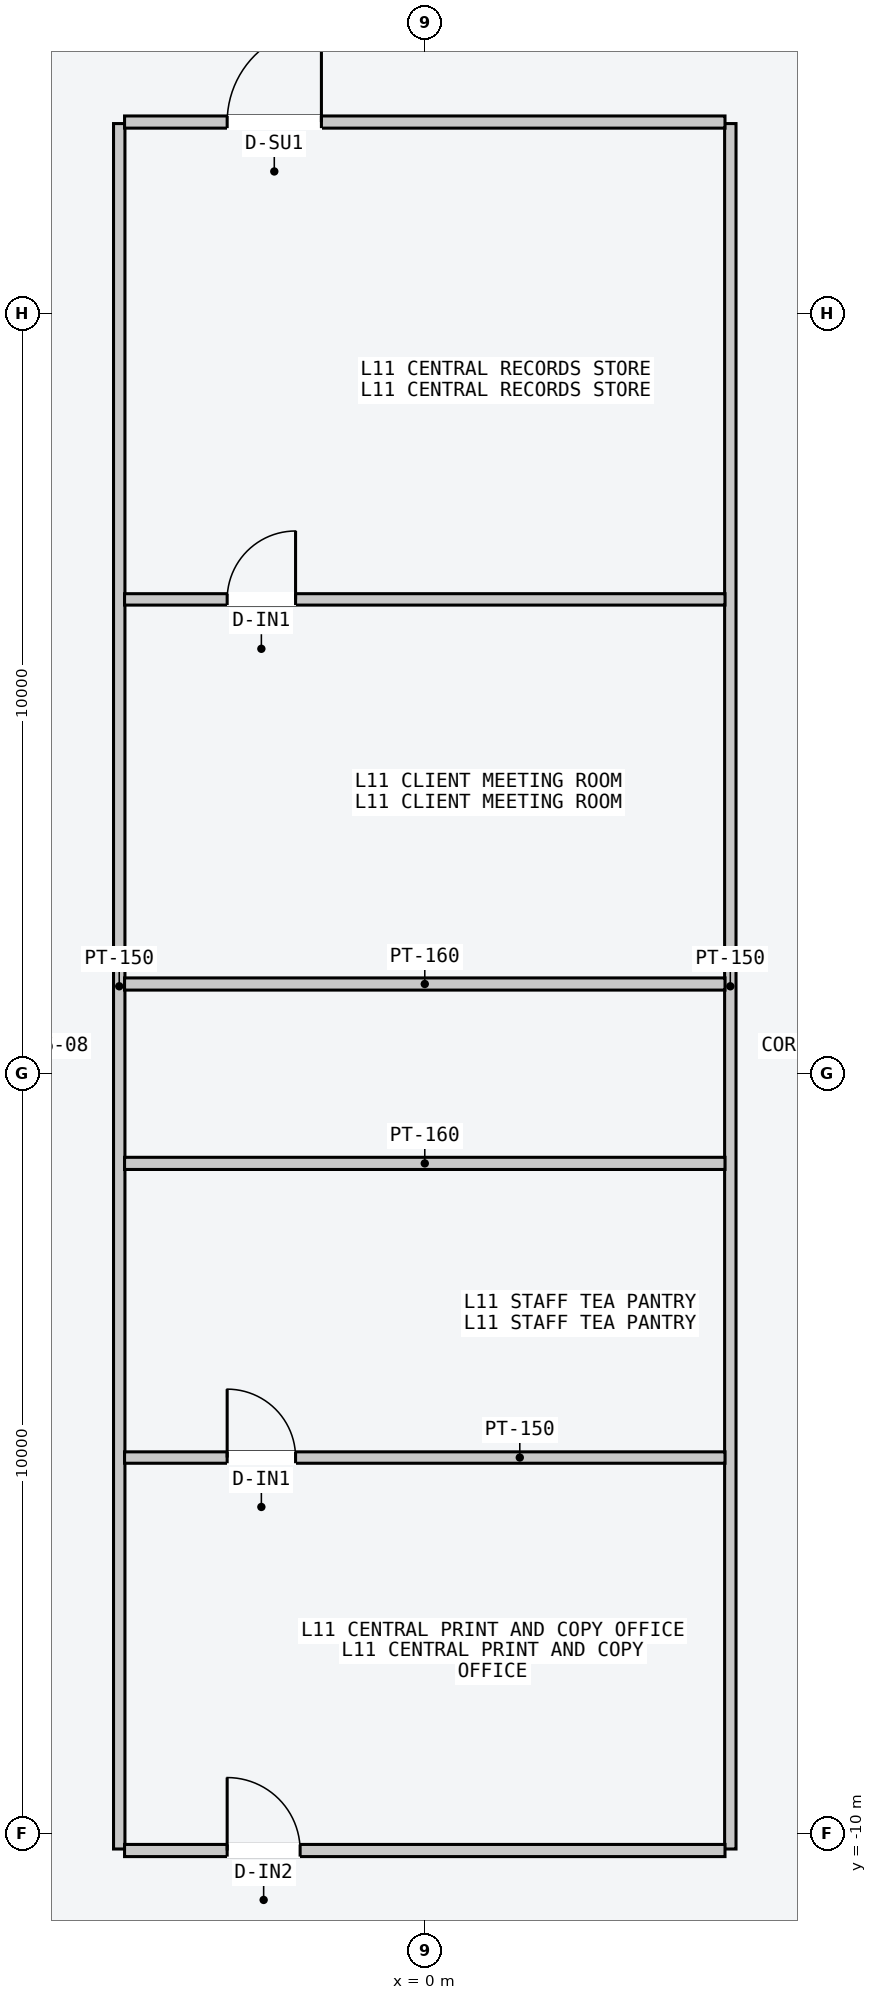
"""IFC4 building model, lengths in metres.
Left out: names, types, materials, properties, quantities, classifications, styles, units other than length and angle.
Written with IfcOpenShell. Run it as: python <this file> out.ifc"""

import sys

from ifc_helpers import new_model, si_unit, direction, frame, frame_2d, origin, place, context, subcontext, project, spatial, rectangle, extrude, element, fill, save


model = new_model("IFC4")
c1 = context("Model", 3, precision=1e-05, world=origin(), true_north=direction((0.0, 1.0)))
c2 = subcontext(c1, "Body", "Model", "MODEL_VIEW")
j1 = project(units=[si_unit("LENGTHUNIT", "METRE"), si_unit("PLANEANGLEUNIT", "RADIAN")], contexts=[c1])
p1 = place(None, origin())
s1 = spatial("IfcSite", under=j1, at=p1, CompositionType="ELEMENT")
p2 = place(p1, origin())
s2 = spatial("IfcBuilding", under=s1, at=p2, CompositionType="ELEMENT")
p3 = place(p2, frame((0.0, 0.0, 45.6)))
s3 = spatial("IfcBuildingStorey", under=s2, at=p3, CompositionType="ELEMENT", Elevation=45.6)
for number, where, z_axis, x_axis in (
    (1, (-4.02, -10.2, 0.0), (0.0, 0.0, 1.0), (0.0, 1.0, 0.0)),
    (2, (4.02, -10.2, 0.0), (0.0, 0.0, 1.0), (0.0, 1.0, 0.0)),
):
    element("IfcWall", number, at=place(p3, frame(where, z_axis=z_axis, x_axis=x_axis)), inside=s3, PredefinedType="PARTITIONING", context=c2, shape_type="SweptSolid", body=[
        extrude(rectangle(XDim=22.7, YDim=0.15, at=frame_2d((11.35, 0.0))), origin(), (0.0, 0.0, 1.0), 3.4),
    ])
p4 = place(p3, frame((-3.95, 1.18, 0.0), z_axis=(0.0, 0.0, 1.0), x_axis=(1.0, 0.0, 0.0)))
e3 = element("IfcWall", 3, at=p4, inside=s3, PredefinedType="PARTITIONING", context=c2, shape_type="SweptSolid", body=[
    extrude(rectangle(XDim=7.9, YDim=0.16, at=frame_2d((3.95, 0.0))), origin(), (0.0, 0.0, 1.0), 3.4),
])
p5 = place(p3, frame((-3.95, 12.52, 0.0), z_axis=(0.0, 0.0, 1.0), x_axis=(1.0, 0.0, 0.0)))
e4 = element("IfcWall", 4, at=p5, inside=s3, PredefinedType="PARTITIONING", context=c2, shape_type="SweptSolid", body=[
    extrude(rectangle(XDim=7.9, YDim=0.16, at=frame_2d((3.95, 0.0))), origin(), (0.0, 0.0, 1.0), 3.4),
])
p6 = place(p5, frame((1.35, 0.0, 0.0)))
e5 = element("IfcOpeningElement", 5, at=p6, cuts=e4, PredefinedType="OPENING", context=c2, shape_type="SweptSolid", body=[
    extrude(rectangle(XDim=1.24, YDim=2.24, at=frame_2d((0.62, 1.12))), frame((0.0, 0.09, 0.0), z_axis=(0.0, -1.0, 0.0), x_axis=(1.0, 0.0, 0.0)), (0.0, 0.0, 1.0), 0.18),
])
p7 = place(p3, frame((-3.95, -1.18, 0.0), z_axis=(0.0, 0.0, 1.0), x_axis=(1.0, 0.0, 0.0)))
e6 = element("IfcWall", 6, at=p7, inside=s3, PredefinedType="PARTITIONING", context=c2, shape_type="SweptSolid", body=[
    extrude(rectangle(XDim=7.9, YDim=0.16, at=frame_2d((3.95, 0.0))), origin(), (0.0, 0.0, 1.0), 3.4),
])
p8 = place(p3, frame((-3.95, -10.22, 0.0), z_axis=(0.0, 0.0, 1.0), x_axis=(1.0, 0.0, 0.0)))
e7 = element("IfcWall", 7, at=p8, inside=s3, PredefinedType="PARTITIONING", context=c2, shape_type="SweptSolid", body=[
    extrude(rectangle(XDim=7.9, YDim=0.16, at=frame_2d((3.95, 0.0))), origin(), (0.0, 0.0, 1.0), 3.4),
])
p9 = place(p8, frame((1.35, 0.0, 0.0)))
e8 = element("IfcOpeningElement", 8, at=p9, cuts=e7, PredefinedType="OPENING", context=c2, shape_type="SweptSolid", body=[
    extrude(rectangle(XDim=0.96, YDim=2.18, at=frame_2d((0.48, 1.09))), frame((0.0, 0.09, 0.0), z_axis=(0.0, -1.0, 0.0), x_axis=(1.0, 0.0, 0.0)), (0.0, 0.0, 1.0), 0.18),
])
p10 = place(p3, frame((-3.95, 6.24, 0.0), z_axis=(0.0, 0.0, 1.0), x_axis=(1.0, 0.0, 0.0)))
e9 = element("IfcWall", 9, at=p10, inside=s3, PredefinedType="PARTITIONING", context=c2, shape_type="SweptSolid", body=[
    extrude(rectangle(XDim=7.9, YDim=0.15, at=frame_2d((3.95, 0.0))), origin(), (0.0, 0.0, 1.0), 3.4),
])
p11 = place(p10, frame((1.35, 0.0, 0.0)))
e10 = element("IfcOpeningElement", 10, at=p11, cuts=e9, PredefinedType="OPENING", context=c2, shape_type="SweptSolid", body=[
    extrude(rectangle(XDim=0.9, YDim=2.15, at=frame_2d((0.45, 1.075))), frame((0.0, 0.085, 0.0), z_axis=(0.0, -1.0, 0.0), x_axis=(1.0, 0.0, 0.0)), (0.0, 0.0, 1.0), 0.17),
])
p12 = place(p3, frame((-3.95, -5.05, 0.0), z_axis=(0.0, 0.0, 1.0), x_axis=(1.0, 0.0, 0.0)))
e11 = element("IfcWall", 11, at=p12, inside=s3, PredefinedType="PARTITIONING", context=c2, shape_type="SweptSolid", body=[
    extrude(rectangle(XDim=7.9, YDim=0.15, at=frame_2d((3.95, 0.0))), origin(), (0.0, 0.0, 1.0), 3.4),
])
p13 = place(p12, frame((1.35, 0.0, 0.0)))
e12 = element("IfcOpeningElement", 12, at=p13, cuts=e11, PredefinedType="OPENING", context=c2, shape_type="SweptSolid", body=[
    extrude(rectangle(XDim=0.9, YDim=2.15, at=frame_2d((0.45, 1.075))), frame((0.0, 0.085, 0.0), z_axis=(0.0, -1.0, 0.0), x_axis=(1.0, 0.0, 0.0)), (0.0, 0.0, 1.0), 0.17),
])
p14 = place(p6, origin())
e13 = element("IfcDoor", 13, at=p14, inside=s3, OperationType="SINGLE_SWING_RIGHT", PredefinedType="DOOR", context=c2, shape_type="SweptSolid", body=[
    extrude(rectangle(XDim=1.24, YDim=2.24, at=frame_2d((0.62, 1.12))), frame((0.0, 0.025, 0.0), z_axis=(0.0, -1.0, 0.0), x_axis=(1.0, 0.0, 0.0)), (0.0, 0.0, 1.0), 0.05),
])
fill(e5, e13)
p15 = place(p9, origin())
e14 = element("IfcDoor", 14, at=p15, inside=s3, OperationType="SINGLE_SWING_LEFT", PredefinedType="DOOR", context=c2, shape_type="SweptSolid", body=[
    extrude(rectangle(XDim=0.96, YDim=2.18, at=frame_2d((0.48, 1.09))), frame((0.0, 0.025, 0.0), z_axis=(0.0, -1.0, 0.0), x_axis=(1.0, 0.0, 0.0)), (0.0, 0.0, 1.0), 0.05),
])
fill(e8, e14)
p16 = place(p11, origin())
e15 = element("IfcDoor", 15, at=p16, inside=s3, OperationType="SINGLE_SWING_RIGHT", PredefinedType="DOOR", context=c2, shape_type="SweptSolid", body=[
    extrude(rectangle(XDim=0.9, YDim=2.15, at=frame_2d((0.45, 1.075))), frame((0.0, 0.025, 0.0), z_axis=(0.0, -1.0, 0.0), x_axis=(1.0, 0.0, 0.0)), (0.0, 0.0, 1.0), 0.05),
])
fill(e10, e15)
p17 = place(p13, origin())
e16 = element("IfcDoor", 16, at=p17, inside=s3, OperationType="SINGLE_SWING_LEFT", PredefinedType="DOOR", context=c2, shape_type="SweptSolid", body=[
    extrude(rectangle(XDim=0.9, YDim=2.15, at=frame_2d((0.45, 1.075))), frame((0.0, 0.025, 0.0), z_axis=(0.0, -1.0, 0.0), x_axis=(1.0, 0.0, 0.0)), (0.0, 0.0, 1.0), 0.05),
])
fill(e12, e16)
save(model, sys.argv[1])
